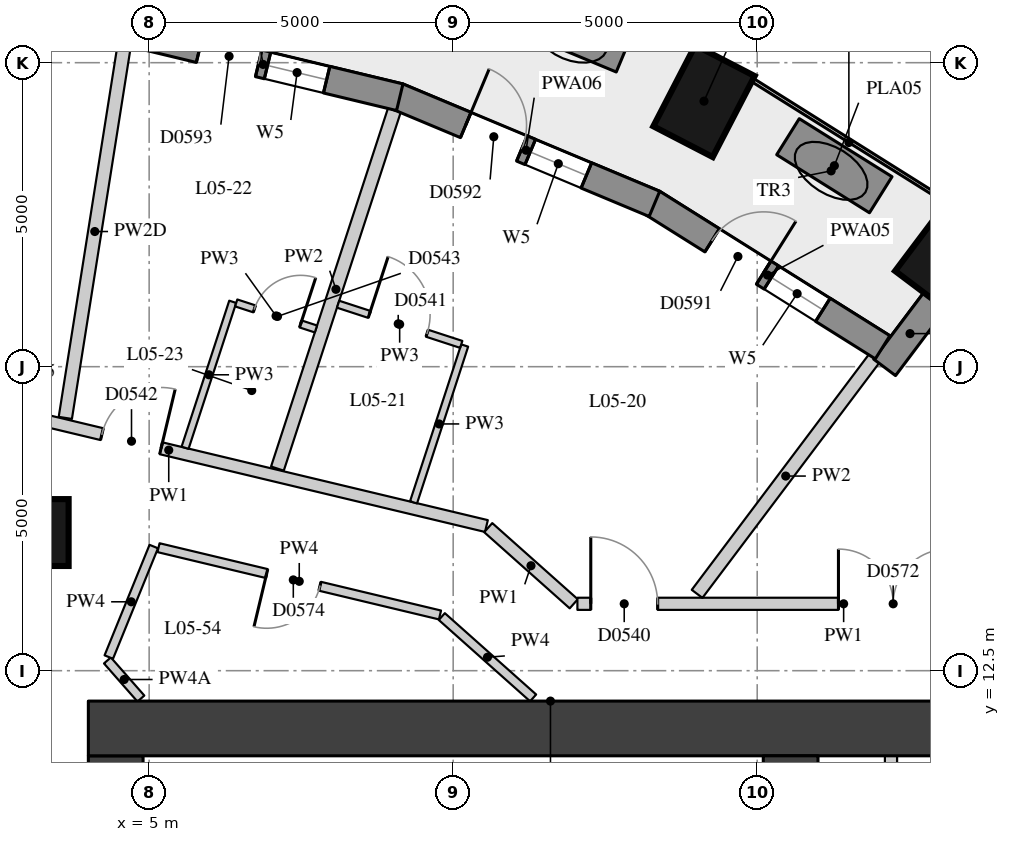
"""IFC4 building model, lengths in metres.
Left out: names, types, materials, properties, quantities, classifications, styles, units other than length and angle.
Written with IfcOpenShell. Run it as: python <this file> out.ifc"""

import sys

from ifc_helpers import new_model, si_unit, direction, frame, frame_2d, origin, origin_2d, place, context, subcontext, project, spatial, rectangle, extrude, element, fill, save


model = new_model("IFC4")
c1 = context("Model", 3, precision=1e-05, world=origin(), true_north=direction((0.0, 1.0)))
c2 = subcontext(c1, "Body", "Model", "MODEL_VIEW")
j1 = project(units=[si_unit("LENGTHUNIT", "METRE"), si_unit("PLANEANGLEUNIT", "RADIAN")], contexts=[c1])
p1 = place(None, origin())
s1 = spatial("IfcSite", under=j1, at=p1, CompositionType="ELEMENT")
p2 = place(p1, origin())
s2 = spatial("IfcBuilding", under=s1, at=p2, CompositionType="ELEMENT")
p3 = place(p2, frame((0.0, 0.0, 25.0)))
s3 = spatial("IfcBuildingStorey", under=s2, at=p3, CompositionType="ELEMENT", Elevation=25.0)
for number, where, z_axis, x_axis in (
    (1, (18.159, 19.343, 0.0), (0.0, 0.0, 1.0), (0.601, 0.799, 0.0)),
    (2, (14.125, 21.867, 0.0), (0.0, 0.0, 1.0), (0.46, 0.888, 0.0)),
):
    element("IfcColumn", number, at=place(p3, frame(where, z_axis=z_axis, x_axis=x_axis)), inside=s3, PredefinedType="COLUMN", context=c2, shape_type="SweptSolid", body=[
        extrude(rectangle(XDim=1.5, YDim=1.1, at=origin_2d()), origin(), (0.0, 0.0, 1.0), 3.3),
    ])
p4 = place(p3, frame((3.126, 14.772, 0.0), z_axis=(0.0, 0.0, 1.0), x_axis=(1.0, 0.0, 0.0)))
e3 = element("IfcColumn", 3, at=p4, inside=s3, PredefinedType="COLUMN", context=c2, shape_type="SweptSolid", body=[
    extrude(rectangle(XDim=1.1, YDim=1.1, at=origin_2d()), origin(), (0.0, 0.0, 1.0), 3.3),
])
p5 = place(p3, frame((17.932, 18.6, 0.0), z_axis=(0.0, 0.0, 1.0), x_axis=(-0.601262851241, -0.799051302306, 0.0)))
e4 = element("IfcWall", 4, at=p5, inside=s3, PredefinedType="SOLIDWALL", context=c2, shape_type="SweptSolid", body=[
    extrude(rectangle(XDim=1.391, YDim=0.45, at=frame_2d((0.696, 0.0))), origin(), (0.0, 0.0, 1.0), 3.02),
])
p6 = place(p3, frame((17.062, 17.819, 0.0), z_axis=(0.0, 0.0, 1.0), x_axis=(-0.846990101364, 0.531608660757, 0.0)))
e5 = element("IfcWall", 5, at=p6, inside=s3, PredefinedType="SOLIDWALL", context=c2, shape_type="SweptSolid", body=[
    extrude(rectangle(XDim=4.469, YDim=0.45, at=frame_2d((2.234, 0.0))), origin(), (0.0, 0.0, 1.0), 3.02),
])
p7 = place(p6, frame((1.159, 0.0, 0.4)))
e6 = element("IfcOpeningElement", 6, at=p7, cuts=e5, PredefinedType="OPENING", context=c2, shape_type="SweptSolid", body=[
    extrude(rectangle(XDim=1.0, YDim=1.75, at=frame_2d((0.5, 0.875))), frame((0.0, 0.235, 0.0), z_axis=(0.0, -1.0, 0.0), x_axis=(1.0, 0.0, 0.0)), (0.0, 0.0, 1.0), 0.47),
])
p8 = place(p6, frame((2.31, 0.0, 0.0)))
e7 = element("IfcOpeningElement", 7, at=p8, cuts=e5, PredefinedType="OPENING", context=c2, shape_type="SweptSolid", body=[
    extrude(rectangle(XDim=1.0, YDim=2.15, at=frame_2d((0.5, 1.075))), frame((0.0, 0.235, 0.0), z_axis=(0.0, -1.0, 0.0), x_axis=(1.0, 0.0, 0.0)), (0.0, 0.0, 1.0), 0.47),
])
p9 = place(p3, frame((13.31, 20.178, 0.0), z_axis=(0.0, 0.0, 1.0), x_axis=(-0.922634412489, 0.385675693935, 0.0)))
e8 = element("IfcWall", 8, at=p9, inside=s3, PredefinedType="SOLIDWALL", context=c2, shape_type="SweptSolid", body=[
    extrude(rectangle(XDim=4.577, YDim=0.45, at=frame_2d((2.288, 0.0))), origin(), (0.0, 0.0, 1.0), 3.02),
])
p10 = place(p9, frame((1.213, 0.0, 0.4)))
e9 = element("IfcOpeningElement", 9, at=p10, cuts=e8, PredefinedType="OPENING", context=c2, shape_type="SweptSolid", body=[
    extrude(rectangle(XDim=1.0, YDim=1.75, at=frame_2d((0.5, 0.875))), frame((0.0, 0.235, 0.0), z_axis=(0.0, -1.0, 0.0), x_axis=(1.0, 0.0, 0.0)), (0.0, 0.0, 1.0), 0.47),
])
p11 = place(p9, frame((2.363, 0.0, 0.0)))
e10 = element("IfcOpeningElement", 10, at=p11, cuts=e8, PredefinedType="OPENING", context=c2, shape_type="SweptSolid", body=[
    extrude(rectangle(XDim=1.0, YDim=2.15, at=frame_2d((0.5, 1.075))), frame((0.0, 0.235, 0.0), z_axis=(0.0, -1.0, 0.0), x_axis=(1.0, 0.0, 0.0)), (0.0, 0.0, 1.0), 0.47),
])
p12 = place(p3, frame((9.122, 21.932, 0.0), z_axis=(0.0, 0.0, 1.0), x_axis=(-0.972346547441, 0.233542697764, 0.0)))
e11 = element("IfcWall", 11, at=p12, inside=s3, PredefinedType="SOLIDWALL", context=c2, shape_type="SweptSolid", body=[
    extrude(rectangle(XDim=4.624, YDim=0.45, at=frame_2d((2.312, 0.0))), origin(), (0.0, 0.0, 1.0), 3.02),
])
p13 = place(p12, frame((1.237, 0.0, 0.4)))
e12 = element("IfcOpeningElement", 12, at=p13, cuts=e11, PredefinedType="OPENING", context=c2, shape_type="SweptSolid", body=[
    extrude(rectangle(XDim=1.0, YDim=1.75, at=frame_2d((0.5, 0.875))), frame((0.0, 0.235, 0.0), z_axis=(0.0, -1.0, 0.0), x_axis=(1.0, 0.0, 0.0)), (0.0, 0.0, 1.0), 0.47),
])
p14 = place(p12, frame((2.387, 0.0, 0.0)))
e13 = element("IfcOpeningElement", 13, at=p14, cuts=e11, PredefinedType="OPENING", context=c2, shape_type="SweptSolid", body=[
    extrude(rectangle(XDim=1.0, YDim=2.15, at=frame_2d((0.5, 1.075))), frame((0.0, 0.235, 0.0), z_axis=(0.0, -1.0, 0.0), x_axis=(1.0, 0.0, 0.0)), (0.0, 0.0, 1.0), 0.47),
])
p15 = place(p3, frame((17.032, 20.328, 0.0), z_axis=(0.0, 0.0, 1.0), x_axis=(-0.847609446823, 0.530620604252, 0.0)))
e14 = element("IfcWall", 14, at=p15, inside=s3, PredefinedType="USERDEFINED", context=c2, shape_type="SweptSolid", body=[
    extrude(rectangle(XDim=1.8, YDim=0.7, at=frame_2d((0.9, 0.0))), origin(), (0.0, 0.0, 1.0), 0.75),
])
p16 = place(p3, frame((12.817, 22.67, 0.0), z_axis=(0.0, 0.0, 1.0), x_axis=(-0.923000660042, 0.384798364811, 0.0)))
e15 = element("IfcWall", 15, at=p16, inside=s3, PredefinedType="USERDEFINED", context=c2, shape_type="SweptSolid", body=[
    extrude(rectangle(XDim=1.8, YDim=0.7, at=frame_2d((0.9, 0.0))), origin(), (0.0, 0.0, 1.0), 0.75),
])
p17 = place(p3, frame((4.45, -11.1, 0.0), z_axis=(0.0, 0.0, 1.0), x_axis=(0.0, 1.0, 0.0)))
e16 = element("IfcWall", 16, at=p17, inside=s3, PredefinedType="SHEAR", context=c2, shape_type="SweptSolid", body=[
    extrude(rectangle(XDim=22.2, YDim=0.9, at=frame_2d((11.1, 0.0))), origin(), (0.0, 0.0, 1.0), 3.02),
])
p18 = place(p17, frame((2.35, 0.0, 0.0)))
e17 = element("IfcOpeningElement", 17, at=p18, cuts=e16, PredefinedType="OPENING", context=c2, shape_type="SweptSolid", body=[
    extrude(rectangle(XDim=1.5, YDim=2.1, at=frame_2d((0.75, 1.05))), frame((0.0, 0.46, 0.0), z_axis=(0.0, -1.0, 0.0), x_axis=(1.0, 0.0, 0.0)), (0.0, 0.0, 1.0), 0.92),
])
p19 = place(p17, frame((5.45, 0.0, 0.0)))
e18 = element("IfcOpeningElement", 18, at=p19, cuts=e16, PredefinedType="OPENING", context=c2, shape_type="SweptSolid", body=[
    extrude(rectangle(XDim=1.8, YDim=2.1, at=frame_2d((0.9, 1.05))), frame((0.0, 0.46, 0.0), z_axis=(0.0, -1.0, 0.0), x_axis=(1.0, 0.0, 0.0)), (0.0, 0.0, 1.0), 0.92),
])
p20 = place(p17, frame((7.95, 0.0, 0.0)))
e19 = element("IfcOpeningElement", 19, at=p20, cuts=e16, PredefinedType="OPENING", context=c2, shape_type="SweptSolid", body=[
    extrude(rectangle(XDim=1.1, YDim=2.1, at=frame_2d((0.55, 1.05))), frame((0.0, 0.46, 0.0), z_axis=(0.0, -1.0, 0.0), x_axis=(1.0, 0.0, 0.0)), (0.0, 0.0, 1.0), 0.92),
])
p21 = place(p17, frame((10.6, 0.0, 0.0)))
e20 = element("IfcOpeningElement", 20, at=p21, cuts=e16, PredefinedType="OPENING", context=c2, shape_type="SweptSolid", body=[
    extrude(rectangle(XDim=1.0, YDim=2.1, at=frame_2d((0.5, 1.05))), frame((0.0, 0.46, 0.0), z_axis=(0.0, -1.0, 0.0), x_axis=(1.0, 0.0, 0.0)), (0.0, 0.0, 1.0), 0.92),
])
p22 = place(p17, frame((13.15, 0.0, 0.0)))
e21 = element("IfcOpeningElement", 21, at=p22, cuts=e16, PredefinedType="OPENING", context=c2, shape_type="SweptSolid", body=[
    extrude(rectangle(XDim=1.1, YDim=2.1, at=frame_2d((0.55, 1.05))), frame((0.0, 0.46, 0.0), z_axis=(0.0, -1.0, 0.0), x_axis=(1.0, 0.0, 0.0)), (0.0, 0.0, 1.0), 0.92),
])
p23 = place(p17, frame((14.95, 0.0, 0.0)))
e22 = element("IfcOpeningElement", 22, at=p23, cuts=e16, PredefinedType="OPENING", context=c2, shape_type="SweptSolid", body=[
    extrude(rectangle(XDim=1.8, YDim=2.1, at=frame_2d((0.9, 1.05))), frame((0.0, 0.46, 0.0), z_axis=(0.0, -1.0, 0.0), x_axis=(1.0, 0.0, 0.0)), (0.0, 0.0, 1.0), 0.92),
])
p24 = place(p17, frame((18.35, 0.0, 0.0)))
e23 = element("IfcOpeningElement", 23, at=p24, cuts=e16, PredefinedType="OPENING", context=c2, shape_type="SweptSolid", body=[
    extrude(rectangle(XDim=1.5, YDim=2.1, at=frame_2d((0.75, 1.05))), frame((0.0, 0.46, 0.0), z_axis=(0.0, -1.0, 0.0), x_axis=(1.0, 0.0, 0.0)), (0.0, 0.0, 1.0), 0.92),
])
p25 = place(p3, frame((4.0, 11.55, 0.0), z_axis=(0.0, 0.0, 1.0), x_axis=(1.0, 0.0, 0.0)))
e24 = element("IfcWall", 24, at=p25, inside=s3, PredefinedType="SHEAR", context=c2, shape_type="SweptSolid", body=[
    extrude(rectangle(XDim=15.2, YDim=0.9, at=frame_2d((7.6, 0.0))), origin(), (0.0, 0.0, 1.0), 3.02),
])
p26 = place(p3, frame((15.55, -11.1, 0.0), z_axis=(0.0, 0.0, 1.0), x_axis=(0.0, 1.0, 0.0)))
e25 = element("IfcWall", 25, at=p26, inside=s3, PredefinedType="SHEAR", context=c2, shape_type="SweptSolid", body=[
    extrude(rectangle(XDim=22.2, YDim=0.9, at=frame_2d((11.1, 0.0))), origin(), (0.0, 0.0, 1.0), 3.02),
])
p27 = place(p26, frame((15.6, 0.0, 0.0)))
e26 = element("IfcOpeningElement", 26, at=p27, cuts=e25, PredefinedType="OPENING", context=c2, shape_type="SweptSolid", body=[
    extrude(rectangle(XDim=1.0, YDim=2.1, at=frame_2d((0.5, 1.05))), frame((0.0, 0.46, 0.0), z_axis=(0.0, -1.0, 0.0), x_axis=(1.0, 0.0, 0.0)), (0.0, 0.0, 1.0), 0.92),
])
p28 = place(p26, frame((5.6, 0.0, 0.0)))
e27 = element("IfcOpeningElement", 27, at=p28, cuts=e25, PredefinedType="OPENING", context=c2, shape_type="SweptSolid", body=[
    extrude(rectangle(XDim=1.0, YDim=2.1, at=frame_2d((0.5, 1.05))), frame((0.0, 0.46, 0.0), z_axis=(0.0, -1.0, 0.0), x_axis=(1.0, 0.0, 0.0)), (0.0, 0.0, 1.0), 0.92),
])
p29 = place(p3, frame((17.2, 6.9, 0.0), z_axis=(0.0, 0.0, 1.0), x_axis=(0.0, 1.0, 0.0)))
e28 = element("IfcWall", 28, at=p29, inside=s3, PredefinedType="PARTITIONING", context=c2, shape_type="SweptSolid", body=[
    extrude(rectangle(XDim=4.2, YDim=0.2, at=frame_2d((2.1, 0.0))), origin(), (0.0, 0.0, 1.0), 3.02),
])
p30 = place(p3, frame((0.098, 17.377, 0.0), z_axis=(0.0, 0.0, 1.0), x_axis=(0.972602241469, -0.232475546864, 0.0)))
e29 = element("IfcWall", 29, at=p30, inside=s3, PredefinedType="PARTITIONING", context=c2, shape_type="SweptSolid", body=[
    extrude(rectangle(XDim=10.743, YDim=0.2, at=frame_2d((5.372, 0.0))), origin(), (0.0, 0.0, 1.0), 3.02),
])
p31 = place(p30, frame((4.242, 0.0, 0.0)))
e30 = element("IfcOpeningElement", 30, at=p31, cuts=e29, PredefinedType="OPENING", context=c2, shape_type="SweptSolid", body=[
    extrude(rectangle(XDim=1.0, YDim=2.1, at=frame_2d((0.5, 1.05))), frame((0.0, 0.11, 0.0), z_axis=(0.0, -1.0, 0.0), x_axis=(1.0, 0.0, 0.0)), (0.0, 0.0, 1.0), 0.22),
])
p32 = place(p30, frame((1.253, 0.0, 0.0)))
e31 = element("IfcOpeningElement", 31, at=p32, cuts=e29, PredefinedType="OPENING", context=c2, shape_type="SweptSolid", body=[
    extrude(rectangle(XDim=0.9, YDim=2.1, at=frame_2d((0.45, 1.05))), frame((0.0, 0.11, 0.0), z_axis=(0.0, -1.0, 0.0), x_axis=(1.0, 0.0, 0.0)), (0.0, 0.0, 1.0), 0.22),
])
p33 = place(p3, frame((10.576, 14.853, 0.0), z_axis=(0.0, 0.0, 1.0), x_axis=(0.746758163178, -0.665095666597, 0.0)))
e32 = element("IfcWall", 32, at=p33, inside=s3, PredefinedType="PARTITIONING", context=c2, shape_type="SweptSolid", body=[
    extrude(rectangle(XDim=1.884, YDim=0.2, at=frame_2d((0.942, 0.0))), origin(), (0.0, 0.0, 1.0), 3.02),
])
p34 = place(p3, frame((12.043, 13.6, 0.0), z_axis=(0.0, 0.0, 1.0), x_axis=(1.0, 0.0, 0.0)))
e33 = element("IfcWall", 33, at=p34, inside=s3, PredefinedType="PARTITIONING", context=c2, shape_type="SweptSolid", body=[
    extrude(rectangle(XDim=8.757, YDim=0.2, at=frame_2d((4.378, 0.0))), origin(), (0.0, 0.0, 1.0), 3.02),
])
p35 = place(p34, frame((0.22, 0.0, 0.0)))
e34 = element("IfcOpeningElement", 34, at=p35, cuts=e33, PredefinedType="OPENING", context=c2, shape_type="SweptSolid", body=[
    extrude(rectangle(XDim=1.1, YDim=2.1, at=frame_2d((0.55, 1.05))), frame((0.0, 0.11, 0.0), z_axis=(0.0, -1.0, 0.0), x_axis=(1.0, 0.0, 0.0)), (0.0, 0.0, 1.0), 0.22),
])
p36 = place(p34, frame((4.293, 0.0, 0.0)))
e35 = element("IfcOpeningElement", 35, at=p36, cuts=e33, PredefinedType="OPENING", context=c2, shape_type="SweptSolid", body=[
    extrude(rectangle(XDim=1.8, YDim=2.1, at=frame_2d((0.9, 1.05))), frame((0.0, 0.11, 0.0), z_axis=(0.0, -1.0, 0.0), x_axis=(1.0, 0.0, 0.0)), (0.0, 0.0, 1.0), 0.22),
])
p37 = place(p3, frame((4.865, 12.042, 0.0), z_axis=(0.0, 0.0, 1.0), x_axis=(-0.660014599896, 0.751252772323, 0.0)))
e36 = element("IfcWall", 36, at=p37, inside=s3, PredefinedType="PARTITIONING", context=c2, shape_type="SweptSolid", body=[
    extrude(rectangle(XDim=0.835, YDim=0.15, at=frame_2d((0.417, 0.0))), origin(), (0.0, 0.0, 1.0), 2.57),
])
p38 = place(p3, frame((4.336, 12.724, 0.0), z_axis=(0.0, 0.0, 1.0), x_axis=(0.376897652409, 0.926254910707, 0.0)))
e37 = element("IfcWall", 37, at=p38, inside=s3, PredefinedType="PARTITIONING", context=c2, shape_type="SweptSolid", body=[
    extrude(rectangle(XDim=1.962, YDim=0.15, at=frame_2d((0.981, 0.0))), origin(), (0.0, 0.0, 1.0), 3.02),
])
p39 = place(p3, frame((5.154, 14.523, 0.0), z_axis=(0.0, 0.0, 1.0), x_axis=(0.972595031209, -0.232505710182, 0.0)))
e38 = element("IfcWall", 38, at=p39, inside=s3, PredefinedType="PARTITIONING", context=c2, shape_type="SweptSolid", body=[
    extrude(rectangle(XDim=4.76, YDim=0.15, at=frame_2d((2.38, 0.0))), origin(), (0.0, 0.0, 1.0), 3.02),
])
p40 = place(p39, frame((1.829, 0.0, 0.0)))
e39 = element("IfcOpeningElement", 39, at=p40, cuts=e38, PredefinedType="OPENING", context=c2, shape_type="SweptSolid", body=[
    extrude(rectangle(XDim=0.9, YDim=2.1, at=frame_2d((0.45, 1.05))), frame((0.0, 0.085, 0.0), z_axis=(0.0, -1.0, 0.0), x_axis=(1.0, 0.0, 0.0)), (0.0, 0.0, 1.0), 0.17),
])
p41 = place(p3, frame((9.813, 13.39, 0.0), z_axis=(0.0, 0.0, 1.0), x_axis=(0.746772740714, -0.665079298825, 0.0)))
e40 = element("IfcWall", 40, at=p41, inside=s3, PredefinedType="PARTITIONING", context=c2, shape_type="SweptSolid", body=[
    extrude(rectangle(XDim=2.011, YDim=0.15, at=frame_2d((1.006, 0.0))), origin(), (0.0, 0.0, 1.0), 3.02),
])
p42 = place(p3, frame((16.927, 17.638, 0.0), z_axis=(0.0, 0.0, 1.0), x_axis=(-0.601183583641, -0.799110942711, 0.0)))
e41 = element("IfcWall", 41, at=p42, inside=s3, PredefinedType="PARTITIONING", context=c2, shape_type="SweptSolid", body=[
    extrude(rectangle(XDim=4.849, YDim=0.22, at=frame_2d((2.424, 0.0))), origin(), (0.0, 0.0, 1.0), 3.02),
])
p43 = place(p3, frame((9.034, 21.721, 0.0), z_axis=(0.0, 0.0, 1.0), x_axis=(-0.310247180826, -0.950655924501, 0.0)))
e42 = element("IfcWall", 42, at=p43, inside=s3, PredefinedType="PARTITIONING", context=c2, shape_type="SweptSolid", body=[
    extrude(rectangle(XDim=6.203, YDim=0.22, at=frame_2d((3.102, 0.0))), origin(), (0.0, 0.0, 1.0), 3.02),
])
p44 = place(p3, frame((4.591, 22.789, 0.0), z_axis=(0.0, 0.0, 1.0), x_axis=(-0.15615243256, -0.987732968877, 0.0)))
e43 = element("IfcWall", 43, at=p44, inside=s3, PredefinedType="PARTITIONING", context=c2, shape_type="SweptSolid", body=[
    extrude(rectangle(XDim=6.207, YDim=0.22, at=frame_2d((3.104, 0.0))), origin(), (0.0, 0.0, 1.0), 2.47),
])
p45 = place(p3, frame((9.348, 15.269, 0.0), z_axis=(0.0, 0.0, 1.0), x_axis=(0.310147893553, 0.950688321231, 0.0)))
e44 = element("IfcWall", 44, at=p45, inside=s3, PredefinedType="PARTITIONING", context=c2, shape_type="SweptSolid", body=[
    extrude(rectangle(XDim=2.713, YDim=0.12, at=frame_2d((1.357, 0.0))), origin(), (0.0, 0.0, 1.0), 3.02),
])
p46 = place(p3, frame((5.591, 16.167, 0.0), z_axis=(0.0, 0.0, 1.0), x_axis=(0.310246659943, 0.950656094492, 0.0)))
e45 = element("IfcWall", 45, at=p46, inside=s3, PredefinedType="PARTITIONING", context=c2, shape_type="SweptSolid", body=[
    extrude(rectangle(XDim=2.525, YDim=0.12, at=frame_2d((1.263, 0.0))), origin(), (0.0, 0.0, 1.0), 3.02),
])
p47 = place(p3, frame((10.132, 17.867, 0.0), z_axis=(0.0, 0.0, 1.0), x_axis=(-0.950681354321, 0.310169248227, 0.0)))
e46 = element("IfcWall", 46, at=p47, inside=s3, PredefinedType="PARTITIONING", context=c2, shape_type="SweptSolid", body=[
    extrude(rectangle(XDim=2.13, YDim=0.12, at=frame_2d((1.065, 0.0))), origin(), (0.0, 0.0, 1.0), 3.02),
])
p48 = place(p47, frame((0.59, 0.0, 0.0)))
e47 = element("IfcOpeningElement", 47, at=p48, cuts=e46, PredefinedType="OPENING", context=c2, shape_type="SweptSolid", body=[
    extrude(rectangle(XDim=1.0, YDim=2.1, at=frame_2d((0.5, 1.05))), frame((0.0, 0.07, 0.0), z_axis=(0.0, -1.0, 0.0), x_axis=(1.0, 0.0, 0.0)), (0.0, 0.0, 1.0), 0.14),
])
p49 = place(p3, frame((6.431, 18.549, 0.0), z_axis=(0.0, 0.0, 1.0), x_axis=(0.950628893115, -0.310329997864, 0.0)))
e48 = element("IfcWall", 48, at=p49, inside=s3, PredefinedType="PARTITIONING", context=c2, shape_type="SweptSolid", body=[
    extrude(rectangle(XDim=1.38, YDim=0.12, at=frame_2d((0.69, 0.0))), origin(), (0.0, 0.0, 1.0), 3.02),
])
p50 = place(p49, frame((0.315, 0.0, 0.0)))
e49 = element("IfcOpeningElement", 49, at=p50, cuts=e48, PredefinedType="OPENING", context=c2, shape_type="SweptSolid", body=[
    extrude(rectangle(XDim=0.8, YDim=2.1, at=frame_2d((0.4, 1.05))), frame((0.0, 0.07, 0.0), z_axis=(0.0, -1.0, 0.0), x_axis=(1.0, 0.0, 0.0)), (0.0, 0.0, 1.0), 0.14),
])
p51 = place(p7, origin())
e50 = element("IfcWindow", 50, at=p51, inside=s3, PartitioningType="SINGLE_PANEL", PredefinedType="WINDOW", context=c2, shape_type="SweptSolid", body=[
    extrude(rectangle(XDim=1.0, YDim=1.75, at=frame_2d((0.5, 0.875))), frame((0.0, 0.035, 0.0), z_axis=(0.0, -1.0, 0.0), x_axis=(1.0, 0.0, 0.0)), (0.0, 0.0, 1.0), 0.06),
])
fill(e6, e50)
p52 = place(p8, frame((1.0, 0.0, 0.0), z_axis=(0.0, 0.0, 1.0), x_axis=(-1.0, 0.0, 0.0)))
e51 = element("IfcDoor", 51, at=p52, inside=s3, OperationType="SINGLE_SWING_RIGHT", PredefinedType="DOOR", context=c2, shape_type="SweptSolid", body=[
    extrude(rectangle(XDim=1.0, YDim=2.15, at=frame_2d((0.5, 1.075))), frame((0.0, 0.075, 0.0), z_axis=(0.0, -1.0, 0.0), x_axis=(1.0, 0.0, 0.0)), (0.0, 0.0, 1.0), 0.05),
])
fill(e7, e51)
p53 = place(p10, origin())
e52 = element("IfcWindow", 52, at=p53, inside=s3, PartitioningType="SINGLE_PANEL", PredefinedType="WINDOW", context=c2, shape_type="SweptSolid", body=[
    extrude(rectangle(XDim=1.0, YDim=1.75, at=frame_2d((0.5, 0.875))), frame((0.0, 0.035, 0.0), z_axis=(0.0, -1.0, 0.0), x_axis=(1.0, 0.0, 0.0)), (0.0, 0.0, 1.0), 0.06),
])
fill(e9, e52)
p54 = place(p11, frame((1.0, 0.0, 0.0), z_axis=(0.0, 0.0, 1.0), x_axis=(-1.0, 0.0, 0.0)))
e53 = element("IfcDoor", 53, at=p54, inside=s3, OperationType="SINGLE_SWING_LEFT", PredefinedType="DOOR", context=c2, shape_type="SweptSolid", body=[
    extrude(rectangle(XDim=1.0, YDim=2.15, at=frame_2d((0.5, 1.075))), frame((0.0, 0.075, 0.0), z_axis=(0.0, -1.0, 0.0), x_axis=(1.0, 0.0, 0.0)), (0.0, 0.0, 1.0), 0.05),
])
fill(e10, e53)
p55 = place(p13, origin())
e54 = element("IfcWindow", 54, at=p55, inside=s3, PartitioningType="SINGLE_PANEL", PredefinedType="WINDOW", context=c2, shape_type="SweptSolid", body=[
    extrude(rectangle(XDim=1.0, YDim=1.75, at=frame_2d((0.5, 0.875))), frame((0.0, 0.035, 0.0), z_axis=(0.0, -1.0, 0.0), x_axis=(1.0, 0.0, 0.0)), (0.0, 0.0, 1.0), 0.06),
])
fill(e12, e54)
p56 = place(p14, frame((1.0, 0.0, 0.0), z_axis=(0.0, 0.0, 1.0), x_axis=(-1.0, 0.0, 0.0)))
e55 = element("IfcDoor", 55, at=p56, inside=s3, OperationType="SINGLE_SWING_LEFT", PredefinedType="DOOR", context=c2, shape_type="SweptSolid", body=[
    extrude(rectangle(XDim=1.0, YDim=2.15, at=frame_2d((0.5, 1.075))), frame((0.0, 0.075, 0.0), z_axis=(0.0, -1.0, 0.0), x_axis=(1.0, 0.0, 0.0)), (0.0, 0.0, 1.0), 0.05),
])
fill(e13, e55)
p57 = place(p35, origin())
e56 = element("IfcDoor", 56, at=p57, inside=s3, OperationType="SINGLE_SWING_LEFT", PredefinedType="DOOR", context=c2, shape_type="SweptSolid", body=[
    extrude(rectangle(XDim=1.1, YDim=2.1, at=frame_2d((0.55, 1.05))), frame((0.0, 0.025, 0.0), z_axis=(0.0, -1.0, 0.0), x_axis=(1.0, 0.0, 0.0)), (0.0, 0.0, 1.0), 0.05),
])
fill(e34, e56)
p58 = place(p48, origin())
e57 = element("IfcDoor", 57, at=p58, inside=s3, OperationType="SINGLE_SWING_LEFT", PredefinedType="DOOR", context=c2, shape_type="SweptSolid", body=[
    extrude(rectangle(XDim=1.0, YDim=2.1, at=frame_2d((0.5, 1.05))), frame((0.0, 0.025, 0.0), z_axis=(0.0, -1.0, 0.0), x_axis=(1.0, 0.0, 0.0)), (0.0, 0.0, 1.0), 0.05),
])
fill(e47, e57)
p59 = place(p31, origin())
e58 = element("IfcDoor", 58, at=p59, inside=s3, OperationType="SINGLE_SWING_RIGHT", PredefinedType="DOOR", context=c2, shape_type="SweptSolid", body=[
    extrude(rectangle(XDim=1.0, YDim=2.1, at=frame_2d((0.5, 1.05))), frame((0.0, 0.025, 0.0), z_axis=(0.0, -1.0, 0.0), x_axis=(1.0, 0.0, 0.0)), (0.0, 0.0, 1.0), 0.05),
])
fill(e30, e58)
p60 = place(p50, origin())
e59 = element("IfcDoor", 59, at=p60, inside=s3, OperationType="SINGLE_SWING_RIGHT", PredefinedType="DOOR", context=c2, shape_type="SweptSolid", body=[
    extrude(rectangle(XDim=0.8, YDim=2.1, at=frame_2d((0.4, 1.05))), frame((0.0, 0.025, 0.0), z_axis=(0.0, -1.0, 0.0), x_axis=(1.0, 0.0, 0.0)), (0.0, 0.0, 1.0), 0.05),
])
fill(e49, e59)
p61 = place(p36, origin())
e60 = element("IfcDoor", 60, at=p61, inside=s3, OperationType="DOUBLE_DOOR_SINGLE_SWING", PredefinedType="DOOR", context=c2, shape_type="SweptSolid", body=[
    extrude(rectangle(XDim=1.8, YDim=2.1, at=frame_2d((0.9, 1.05))), frame((0.0, 0.025, 0.0), z_axis=(0.0, -1.0, 0.0), x_axis=(1.0, 0.0, 0.0)), (0.0, 0.0, 1.0), 0.05),
])
fill(e35, e60)
p62 = place(p40, origin())
e61 = element("IfcDoor", 61, at=p62, inside=s3, OperationType="SINGLE_SWING_RIGHT", PredefinedType="DOOR", context=c2, shape_type="SweptSolid", body=[
    extrude(rectangle(XDim=0.9, YDim=2.1, at=frame_2d((0.45, 1.05))), frame((0.0, 0.025, 0.0), z_axis=(0.0, -1.0, 0.0), x_axis=(1.0, 0.0, 0.0)), (0.0, 0.0, 1.0), 0.05),
])
fill(e39, e61)
save(model, sys.argv[1])
